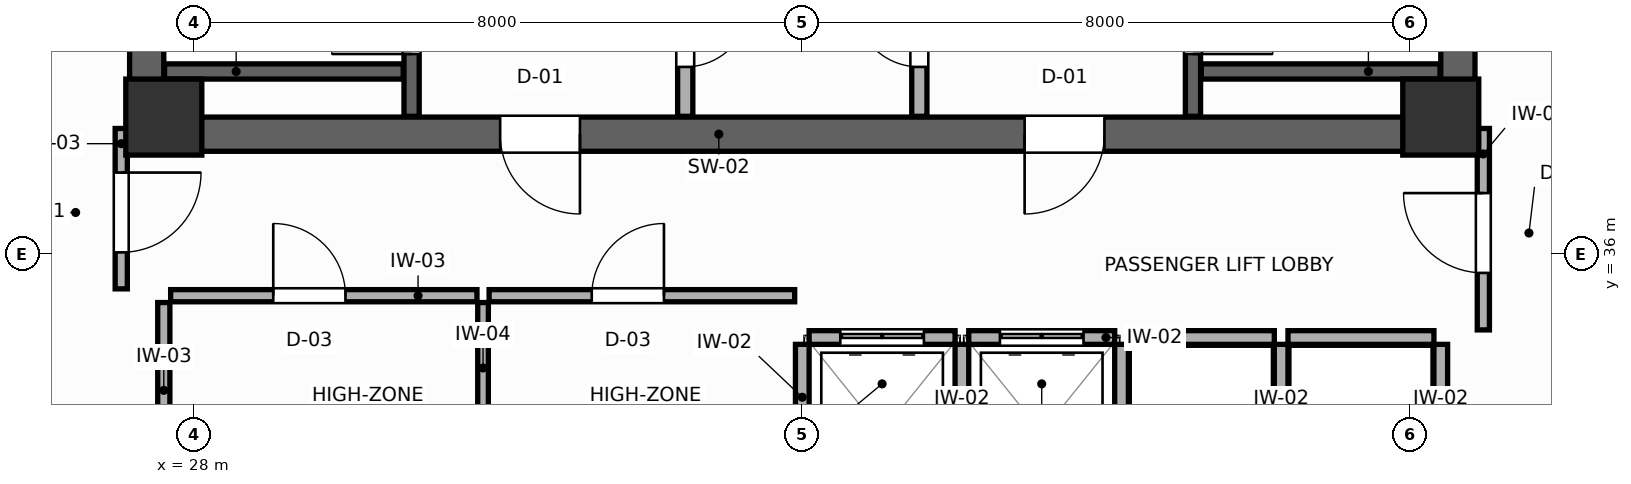
"""IFC4 building model, lengths in metres.
Left out: names, types, materials, properties, quantities, classifications, styles, units other than length and angle.
Written with IfcOpenShell. Run it as: python <this file> out.ifc"""

import sys

from ifc_helpers import new_model, si_unit, direction, frame, frame_2d, origin, origin_2d, place, context, subcontext, project, spatial, rectangle, extrude, source, transform, mapped, element, fill, save


model = new_model("IFC4")
c1 = context("Model", 3, precision=1e-05, world=origin(), true_north=direction((0.0, 1.0)))
c2 = subcontext(c1, "Body", "Model", "MODEL_VIEW")
j1 = project(units=[si_unit("LENGTHUNIT", "METRE"), si_unit("PLANEANGLEUNIT", "RADIAN")], contexts=[c1])
p1 = place(None, origin())
s1 = spatial("IfcSite", under=j1, at=p1, CompositionType="ELEMENT")
p2 = place(p1, origin())
s2 = spatial("IfcBuilding", under=s1, at=p2, CompositionType="ELEMENT")
p3 = place(p2, frame((0.0, 0.0, 190.2)))
s3 = spatial("IfcBuildingStorey", under=s2, at=p3, CompositionType="ELEMENT", Elevation=190.2)
p4 = place(p3, frame((27.15, 37.575, 0.0), z_axis=(0.0, 0.0, 1.0), x_axis=(1.0, 0.0, 0.0)))
e1 = element("IfcWall", 1, at=p4, inside=s3, PredefinedType="SHEAR", context=c2, shape_type="SweptSolid", body=[
    extrude(rectangle(XDim=17.7, YDim=0.45, at=frame_2d((8.85, 0.0))), origin(), (0.0, 0.0, 1.0), 3.6),
])
p5 = place(p4, frame((4.875, 0.0, 0.0)))
e2 = element("IfcOpeningElement", 2, at=p5, cuts=e1, PredefinedType="OPENING", context=c2, shape_type="SweptSolid", body=[
    extrude(rectangle(XDim=1.05, YDim=2.1, at=frame_2d((0.525, 1.05))), frame((0.0, 0.235, 0.0), z_axis=(0.0, -1.0, 0.0), x_axis=(1.0, 0.0, 0.0)), (0.0, 0.0, 1.0), 0.47),
])
p6 = place(p4, frame((11.775, 0.0, 0.0)))
e3 = element("IfcOpeningElement", 3, at=p6, cuts=e1, PredefinedType="OPENING", context=c2, shape_type="SweptSolid", body=[
    extrude(rectangle(XDim=1.05, YDim=2.1, at=frame_2d((0.525, 1.05))), frame((0.0, 0.235, 0.0), z_axis=(0.0, -1.0, 0.0), x_axis=(1.0, 0.0, 0.0)), (0.0, 0.0, 1.0), 0.47),
])
for number, where, z_axis, x_axis in (
    (4, (27.375, 37.8, 0.0), (0.0, 0.0, 1.0), (0.0, 1.0, 0.0)),
    (5, (44.625, 37.8, 0.0), (0.0, 0.0, 1.0), (0.0, 1.0, 0.0)),
):
    element("IfcWall", number, at=place(p3, frame(where, z_axis=z_axis, x_axis=x_axis)), inside=s3, PredefinedType="SHEAR", context=c2, shape_type="SweptSolid", body=[
        extrude(rectangle(XDim=9.0, YDim=0.45, at=frame_2d((4.5, 0.0))), origin(), (0.0, 0.0, 1.0), 3.6),
    ])
m1 = source(origin(), c2, "Body", "SweptSolid", [
    extrude(rectangle(XDim=1.0, YDim=1.0, at=origin_2d()), origin(), (0.0, 0.0, 1.0), 3.6),
])
for number, where, z_axis, x_axis in (
    (6, (27.6, 37.8, 0.0), (0.0, 0.0, 1.0), (1.0, 0.0, 0.0)),
    (7, (44.4, 37.8, 0.0), (0.0, 0.0, 1.0), (1.0, 0.0, 0.0)),
):
    element("IfcColumn", number, at=place(p3, frame(where, z_axis=z_axis, x_axis=x_axis)), inside=s3, PredefinedType="COLUMN", context=c2, shape_type="MappedRepresentation", body=[
        mapped(m1, transform((0.0, 0.0, 0.0), scale=1.0)),
    ])
p7 = place(p3, frame((30.86, 37.81, 0.0), z_axis=(0.0, 0.0, 1.0), x_axis=(0.0, 1.0, 0.0)))
e8 = element("IfcWall", 8, at=p7, inside=s3, PredefinedType="SHEAR", context=c2, shape_type="SweptSolid", body=[
    extrude(rectangle(XDim=8.98, YDim=0.2, at=frame_2d((4.49, 0.0))), origin(), (0.0, 0.0, 1.0), 3.6),
])
p8 = place(p7, frame((0.82, 0.0, 0.0)))
e9 = element("IfcOpeningElement", 9, at=p8, cuts=e8, PredefinedType="OPENING", context=c2, shape_type="SweptSolid", body=[
    extrude(rectangle(XDim=1.05, YDim=2.1, at=frame_2d((0.525, 1.05))), frame((0.0, 0.11, 0.0), z_axis=(0.0, -1.0, 0.0), x_axis=(1.0, 0.0, 0.0)), (0.0, 0.0, 1.0), 0.22),
])
p9 = place(p3, frame((27.61, 38.4, 0.0), z_axis=(0.0, 0.0, 1.0), x_axis=(1.0, 0.0, 0.0)))
e10 = element("IfcWall", 10, at=p9, inside=s3, PredefinedType="SHEAR", context=c2, shape_type="SweptSolid", body=[
    extrude(rectangle(XDim=3.14, YDim=0.2, at=frame_2d((1.57, 0.0))), origin(), (0.0, 0.0, 1.0), 3.6),
])
p10 = place(p3, frame((41.14, 37.81, 0.0), z_axis=(0.0, 0.0, 1.0), x_axis=(0.0, 1.0, 0.0)))
e11 = element("IfcWall", 11, at=p10, inside=s3, PredefinedType="SHEAR", context=c2, shape_type="SweptSolid", body=[
    extrude(rectangle(XDim=8.98, YDim=0.2, at=frame_2d((4.49, 0.0))), origin(), (0.0, 0.0, 1.0), 3.6),
])
p11 = place(p10, frame((0.82, 0.0, 0.0)))
e12 = element("IfcOpeningElement", 12, at=p11, cuts=e11, PredefinedType="OPENING", context=c2, shape_type="SweptSolid", body=[
    extrude(rectangle(XDim=1.05, YDim=2.1, at=frame_2d((0.525, 1.05))), frame((0.0, 0.11, 0.0), z_axis=(0.0, -1.0, 0.0), x_axis=(1.0, 0.0, 0.0)), (0.0, 0.0, 1.0), 0.22),
])
p12 = place(p3, frame((41.25, 38.4, 0.0), z_axis=(0.0, 0.0, 1.0), x_axis=(1.0, 0.0, 0.0)))
e13 = element("IfcWall", 13, at=p12, inside=s3, PredefinedType="SHEAR", context=c2, shape_type="SweptSolid", body=[
    extrude(rectangle(XDim=3.14, YDim=0.2, at=frame_2d((1.57, 0.0))), origin(), (0.0, 0.0, 1.0), 3.6),
])
p13 = place(p3, frame((34.46, 37.81, 0.0), z_axis=(0.0, 0.0, 1.0), x_axis=(0.0, 1.0, 0.0)))
e14 = element("IfcWall", 14, at=p13, inside=s3, PredefinedType="PARTITIONING", context=c2, shape_type="SweptSolid", body=[
    extrude(rectangle(XDim=8.98, YDim=0.2, at=frame_2d((4.49, 0.0))), origin(), (0.0, 0.0, 1.0), 3.4),
])
p14 = place(p13, frame((0.65, 0.0, 0.0)))
e15 = element("IfcOpeningElement", 15, at=p14, cuts=e14, PredefinedType="OPENING", context=c2, shape_type="SweptSolid", body=[
    extrude(rectangle(XDim=0.85, YDim=2.05, at=frame_2d((0.425, 1.025))), frame((0.0, 0.11, 0.0), z_axis=(0.0, -1.0, 0.0), x_axis=(1.0, 0.0, 0.0)), (0.0, 0.0, 1.0), 0.22),
])
p15 = place(p3, frame((37.54, 37.81, 0.0), z_axis=(0.0, 0.0, 1.0), x_axis=(0.0, 1.0, 0.0)))
e16 = element("IfcWall", 16, at=p15, inside=s3, PredefinedType="PARTITIONING", context=c2, shape_type="SweptSolid", body=[
    extrude(rectangle(XDim=8.98, YDim=0.2, at=frame_2d((4.49, 0.0))), origin(), (0.0, 0.0, 1.0), 3.4),
])
p16 = place(p15, frame((0.65, 0.0, 0.0)))
e17 = element("IfcOpeningElement", 17, at=p16, cuts=e16, PredefinedType="OPENING", context=c2, shape_type="SweptSolid", body=[
    extrude(rectangle(XDim=0.85, YDim=2.05, at=frame_2d((0.425, 1.025))), frame((0.0, 0.11, 0.0), z_axis=(0.0, -1.0, 0.0), x_axis=(1.0, 0.0, 0.0)), (0.0, 0.0, 1.0), 0.22),
])
p17 = place(p3, frame((36.09, 34.9, 0.0), z_axis=(0.0, 0.0, 1.0), x_axis=(1.0, 0.0, 0.0)))
e18 = element("IfcWall", 18, at=p17, inside=s3, PredefinedType="PARTITIONING", context=c2, shape_type="SweptSolid", body=[
    extrude(rectangle(XDim=1.92, YDim=0.18, at=frame_2d((0.96, 0.0))), origin(), (0.0, 0.0, 1.0), 3.4),
])
p18 = place(p17, frame((0.41, 0.0, 0.0)))
e19 = element("IfcOpeningElement", 19, at=p18, cuts=e18, PredefinedType="OPENING", context=c2, shape_type="SweptSolid", body=[
    extrude(rectangle(XDim=1.1, YDim=2.1, at=frame_2d((0.55, 1.05))), frame((0.0, 0.1, 0.0), z_axis=(0.0, -1.0, 0.0), x_axis=(1.0, 0.0, 0.0)), (0.0, 0.0, 1.0), 0.2),
])
p19 = place(p3, frame((36.0, 32.49, 0.0), z_axis=(0.0, 0.0, 1.0), x_axis=(0.0, 1.0, 0.0)))
e20 = element("IfcWall", 20, at=p19, inside=s3, PredefinedType="PARTITIONING", context=c2, shape_type="SweptSolid", body=[
    extrude(rectangle(XDim=2.32, YDim=0.18, at=frame_2d((1.16, 0.0))), origin(), (0.0, 0.0, 1.0), 3.4),
])
p20 = place(p3, frame((38.19, 34.9, 0.0), z_axis=(0.0, 0.0, 1.0), x_axis=(1.0, 0.0, 0.0)))
e21 = element("IfcWall", 21, at=p20, inside=s3, PredefinedType="PARTITIONING", context=c2, shape_type="SweptSolid", body=[
    extrude(rectangle(XDim=1.92, YDim=0.18, at=frame_2d((0.96, 0.0))), origin(), (0.0, 0.0, 1.0), 3.4),
])
p21 = place(p20, frame((0.41, 0.0, 0.0)))
e22 = element("IfcOpeningElement", 22, at=p21, cuts=e21, PredefinedType="OPENING", context=c2, shape_type="SweptSolid", body=[
    extrude(rectangle(XDim=1.1, YDim=2.1, at=frame_2d((0.55, 1.05))), frame((0.0, 0.1, 0.0), z_axis=(0.0, -1.0, 0.0), x_axis=(1.0, 0.0, 0.0)), (0.0, 0.0, 1.0), 0.2),
])
p22 = place(p3, frame((38.1, 32.49, 0.0), z_axis=(0.0, 0.0, 1.0), x_axis=(0.0, 1.0, 0.0)))
e23 = element("IfcWall", 23, at=p22, inside=s3, PredefinedType="PARTITIONING", context=c2, shape_type="SweptSolid", body=[
    extrude(rectangle(XDim=2.32, YDim=0.18, at=frame_2d((1.16, 0.0))), origin(), (0.0, 0.0, 1.0), 3.4),
])
p23 = place(p3, frame((40.29, 34.9, 0.0), z_axis=(0.0, 0.0, 1.0), x_axis=(1.0, 0.0, 0.0)))
e24 = element("IfcWall", 24, at=p23, inside=s3, PredefinedType="PARTITIONING", context=c2, shape_type="SweptSolid", body=[
    extrude(rectangle(XDim=1.92, YDim=0.18, at=frame_2d((0.96, 0.0))), origin(), (0.0, 0.0, 1.0), 3.4),
])
p24 = place(p3, frame((40.2, 32.49, 0.0), z_axis=(0.0, 0.0, 1.0), x_axis=(0.0, 1.0, 0.0)))
e25 = element("IfcWall", 25, at=p24, inside=s3, PredefinedType="PARTITIONING", context=c2, shape_type="SweptSolid", body=[
    extrude(rectangle(XDim=2.32, YDim=0.18, at=frame_2d((1.16, 0.0))), origin(), (0.0, 0.0, 1.0), 3.4),
])
p25 = place(p3, frame((42.39, 34.9, 0.0), z_axis=(0.0, 0.0, 1.0), x_axis=(1.0, 0.0, 0.0)))
e26 = element("IfcWall", 26, at=p25, inside=s3, PredefinedType="PARTITIONING", context=c2, shape_type="SweptSolid", body=[
    extrude(rectangle(XDim=1.92, YDim=0.18, at=frame_2d((0.96, 0.0))), origin(), (0.0, 0.0, 1.0), 3.4),
])
for number, where, z_axis, x_axis in (
    (27, (42.3, 32.49, 0.0), (0.0, 0.0, 1.0), (0.0, 1.0, 0.0)),
    (28, (44.4, 32.49, 0.0), (0.0, 0.0, 1.0), (0.0, 1.0, 0.0)),
):
    element("IfcWall", number, at=place(p3, frame(where, z_axis=z_axis, x_axis=x_axis)), inside=s3, PredefinedType="PARTITIONING", context=c2, shape_type="SweptSolid", body=[
        extrude(rectangle(XDim=2.32, YDim=0.18, at=frame_2d((1.16, 0.0))), origin(), (0.0, 0.0, 1.0), 3.4),
    ])
p26 = place(p3, frame((27.6, 33.05, 0.0), z_axis=(0.0, 0.0, 1.0), x_axis=(0.0, 1.0, 0.0)))
e29 = element("IfcWall", 29, at=p26, inside=s3, PredefinedType="PARTITIONING", context=c2, shape_type="SweptSolid", body=[
    extrude(rectangle(XDim=2.31, YDim=0.16, at=frame_2d((1.155, 0.0))), origin(), (0.0, 0.0, 1.0), 3.4),
])
p27 = place(p3, frame((31.8, 32.49, 0.0), z_axis=(0.0, 0.0, 1.0), x_axis=(0.0, 1.0, 0.0)))
e30 = element("IfcWall", 30, at=p27, inside=s3, PredefinedType="PARTITIONING", context=c2, shape_type="SweptSolid", body=[
    extrude(rectangle(XDim=2.87, YDim=0.14, at=frame_2d((1.435, 0.0))), origin(), (0.0, 0.0, 1.0), 3.4),
])
p28 = place(p3, frame((27.69, 35.45, 0.0), z_axis=(0.0, 0.0, 1.0), x_axis=(1.0, 0.0, 0.0)))
e31 = element("IfcWall", 31, at=p28, inside=s3, PredefinedType="PARTITIONING", context=c2, shape_type="SweptSolid", body=[
    extrude(rectangle(XDim=4.03, YDim=0.16, at=frame_2d((2.015, 0.0))), origin(), (0.0, 0.0, 1.0), 3.4),
])
p29 = place(p28, frame((1.35, 0.0, 0.0)))
e32 = element("IfcOpeningElement", 32, at=p29, cuts=e31, PredefinedType="OPENING", context=c2, shape_type="SweptSolid", body=[
    extrude(rectangle(XDim=0.95, YDim=2.05, at=frame_2d((0.475, 1.025))), frame((0.0, 0.09, 0.0), z_axis=(0.0, -1.0, 0.0), x_axis=(1.0, 0.0, 0.0)), (0.0, 0.0, 1.0), 0.18),
])
p30 = place(p3, frame((31.88, 35.45, 0.0), z_axis=(0.0, 0.0, 1.0), x_axis=(1.0, 0.0, 0.0)))
e33 = element("IfcWall", 33, at=p30, inside=s3, PredefinedType="PARTITIONING", context=c2, shape_type="SweptSolid", body=[
    extrude(rectangle(XDim=4.02, YDim=0.16, at=frame_2d((2.01, 0.0))), origin(), (0.0, 0.0, 1.0), 3.4),
])
p31 = place(p30, frame((1.35, 0.0, 0.0)))
e34 = element("IfcOpeningElement", 34, at=p31, cuts=e33, PredefinedType="OPENING", context=c2, shape_type="SweptSolid", body=[
    extrude(rectangle(XDim=0.95, YDim=2.05, at=frame_2d((0.475, 1.025))), frame((0.0, 0.09, 0.0), z_axis=(0.0, -1.0, 0.0), x_axis=(1.0, 0.0, 0.0)), (0.0, 0.0, 1.0), 0.18),
])
p32 = place(p3, frame((27.04, 35.54, 0.0), z_axis=(0.0, 0.0, 1.0), x_axis=(0.0, 1.0, 0.0)))
e35 = element("IfcWall", 35, at=p32, inside=s3, PredefinedType="PARTITIONING", context=c2, shape_type="SweptSolid", body=[
    extrude(rectangle(XDim=2.11, YDim=0.16, at=frame_2d((1.055, 0.0))), origin(), (0.0, 0.0, 1.0), 3.4),
])
p33 = place(p32, frame((0.48, 0.0, 0.0)))
e36 = element("IfcOpeningElement", 36, at=p33, cuts=e35, PredefinedType="OPENING", context=c2, shape_type="SweptSolid", body=[
    extrude(rectangle(XDim=1.05, YDim=2.1, at=frame_2d((0.525, 1.05))), frame((0.0, 0.09, 0.0), z_axis=(0.0, -1.0, 0.0), x_axis=(1.0, 0.0, 0.0)), (0.0, 0.0, 1.0), 0.18),
])
p34 = place(p3, frame((44.96, 35.0, 0.0), z_axis=(0.0, 0.0, 1.0), x_axis=(0.0, 1.0, 0.0)))
e37 = element("IfcWall", 37, at=p34, inside=s3, PredefinedType="PARTITIONING", context=c2, shape_type="SweptSolid", body=[
    extrude(rectangle(XDim=2.65, YDim=0.16, at=frame_2d((1.325, 0.0))), origin(), (0.0, 0.0, 1.0), 3.4),
])
p35 = place(p34, frame((0.75, 0.0, 0.0)))
e38 = element("IfcOpeningElement", 38, at=p35, cuts=e37, PredefinedType="OPENING", context=c2, shape_type="SweptSolid", body=[
    extrude(rectangle(XDim=1.05, YDim=2.1, at=frame_2d((0.525, 1.05))), frame((0.0, 0.09, 0.0), z_axis=(0.0, -1.0, 0.0), x_axis=(1.0, 0.0, 0.0)), (0.0, 0.0, 1.0), 0.18),
])
p36 = place(p8, origin())
e39 = element("IfcDoor", 39, at=p36, inside=s3, OperationType="SINGLE_SWING_LEFT", PredefinedType="DOOR", context=c2, shape_type="SweptSolid", body=[
    extrude(rectangle(XDim=1.05, YDim=2.1, at=frame_2d((0.525, 1.05))), frame((0.0, 0.025, 0.0), z_axis=(0.0, -1.0, 0.0), x_axis=(1.0, 0.0, 0.0)), (0.0, 0.0, 1.0), 0.05),
])
fill(e9, e39)
p37 = place(p11, frame((1.05, 0.0, 0.0), z_axis=(0.0, 0.0, 1.0), x_axis=(-1.0, 0.0, 0.0)))
e40 = element("IfcDoor", 40, at=p37, inside=s3, OperationType="SINGLE_SWING_RIGHT", PredefinedType="DOOR", context=c2, shape_type="SweptSolid", body=[
    extrude(rectangle(XDim=1.05, YDim=2.1, at=frame_2d((0.525, 1.05))), frame((0.0, 0.025, 0.0), z_axis=(0.0, -1.0, 0.0), x_axis=(1.0, 0.0, 0.0)), (0.0, 0.0, 1.0), 0.05),
])
fill(e12, e40)
p38 = place(p14, frame((0.85, 0.0, 0.0), z_axis=(0.0, 0.0, 1.0), x_axis=(-1.0, 0.0, 0.0)))
e41 = element("IfcDoor", 41, at=p38, inside=s3, OperationType="SINGLE_SWING_LEFT", PredefinedType="DOOR", context=c2, shape_type="SweptSolid", body=[
    extrude(rectangle(XDim=0.85, YDim=2.05, at=frame_2d((0.425, 1.025))), frame((0.0, 0.025, 0.0), z_axis=(0.0, -1.0, 0.0), x_axis=(1.0, 0.0, 0.0)), (0.0, 0.0, 1.0), 0.05),
])
fill(e15, e41)
p39 = place(p16, origin())
e42 = element("IfcDoor", 42, at=p39, inside=s3, OperationType="SINGLE_SWING_RIGHT", PredefinedType="DOOR", context=c2, shape_type="SweptSolid", body=[
    extrude(rectangle(XDim=0.85, YDim=2.05, at=frame_2d((0.425, 1.025))), frame((0.0, 0.025, 0.0), z_axis=(0.0, -1.0, 0.0), x_axis=(1.0, 0.0, 0.0)), (0.0, 0.0, 1.0), 0.05),
])
fill(e17, e42)
p40 = place(p18, origin())
e43 = element("IfcDoor", 43, at=p40, inside=s3, OperationType="DOUBLE_DOOR_SLIDING", PredefinedType="DOOR", context=c2, shape_type="SweptSolid", body=[
    extrude(rectangle(XDim=1.1, YDim=2.1, at=frame_2d((0.55, 1.05))), frame((0.0, 0.025, 0.0), z_axis=(0.0, -1.0, 0.0), x_axis=(1.0, 0.0, 0.0)), (0.0, 0.0, 1.0), 0.05),
])
fill(e19, e43)
p41 = place(p21, origin())
e44 = element("IfcDoor", 44, at=p41, inside=s3, OperationType="DOUBLE_DOOR_SLIDING", PredefinedType="DOOR", context=c2, shape_type="SweptSolid", body=[
    extrude(rectangle(XDim=1.1, YDim=2.1, at=frame_2d((0.55, 1.05))), frame((0.0, 0.025, 0.0), z_axis=(0.0, -1.0, 0.0), x_axis=(1.0, 0.0, 0.0)), (0.0, 0.0, 1.0), 0.05),
])
fill(e22, e44)
p42 = place(p29, origin())
e45 = element("IfcDoor", 45, at=p42, inside=s3, OperationType="SINGLE_SWING_LEFT", PredefinedType="DOOR", context=c2, shape_type="SweptSolid", body=[
    extrude(rectangle(XDim=0.95, YDim=2.05, at=frame_2d((0.475, 1.025))), frame((0.0, 0.025, 0.0), z_axis=(0.0, -1.0, 0.0), x_axis=(1.0, 0.0, 0.0)), (0.0, 0.0, 1.0), 0.05),
])
fill(e32, e45)
p43 = place(p31, origin())
e46 = element("IfcDoor", 46, at=p43, inside=s3, OperationType="SINGLE_SWING_RIGHT", PredefinedType="DOOR", context=c2, shape_type="SweptSolid", body=[
    extrude(rectangle(XDim=0.95, YDim=2.05, at=frame_2d((0.475, 1.025))), frame((0.0, 0.025, 0.0), z_axis=(0.0, -1.0, 0.0), x_axis=(1.0, 0.0, 0.0)), (0.0, 0.0, 1.0), 0.05),
])
fill(e34, e46)
p44 = place(p33, frame((1.05, 0.0, 0.0), z_axis=(0.0, 0.0, 1.0), x_axis=(-1.0, 0.0, 0.0)))
e47 = element("IfcDoor", 47, at=p44, inside=s3, OperationType="SINGLE_SWING_LEFT", PredefinedType="DOOR", context=c2, shape_type="SweptSolid", body=[
    extrude(rectangle(XDim=1.05, YDim=2.1, at=frame_2d((0.525, 1.05))), frame((0.0, 0.025, 0.0), z_axis=(0.0, -1.0, 0.0), x_axis=(1.0, 0.0, 0.0)), (0.0, 0.0, 1.0), 0.05),
])
fill(e36, e47)
p45 = place(p35, origin())
e48 = element("IfcDoor", 48, at=p45, inside=s3, OperationType="SINGLE_SWING_RIGHT", PredefinedType="DOOR", context=c2, shape_type="SweptSolid", body=[
    extrude(rectangle(XDim=1.05, YDim=2.1, at=frame_2d((0.525, 1.05))), frame((0.0, 0.025, 0.0), z_axis=(0.0, -1.0, 0.0), x_axis=(1.0, 0.0, 0.0)), (0.0, 0.0, 1.0), 0.05),
])
fill(e38, e48)
p46 = place(p5, frame((1.05, 0.0, 0.0), z_axis=(0.0, 0.0, 1.0), x_axis=(-1.0, 0.0, 0.0)))
e49 = element("IfcDoor", 49, at=p46, inside=s3, OperationType="SINGLE_SWING_LEFT", PredefinedType="DOOR", context=c2, shape_type="SweptSolid", body=[
    extrude(rectangle(XDim=1.05, YDim=2.1, at=frame_2d((0.525, 1.05))), frame((0.0, 0.025, 0.0), z_axis=(0.0, -1.0, 0.0), x_axis=(1.0, 0.0, 0.0)), (0.0, 0.0, 1.0), 0.05),
])
fill(e2, e49)
p47 = place(p6, frame((1.05, 0.0, 0.0), z_axis=(0.0, 0.0, 1.0), x_axis=(-1.0, 0.0, 0.0)))
e50 = element("IfcDoor", 50, at=p47, inside=s3, OperationType="SINGLE_SWING_RIGHT", PredefinedType="DOOR", context=c2, shape_type="SweptSolid", body=[
    extrude(rectangle(XDim=1.05, YDim=2.1, at=frame_2d((0.525, 1.05))), frame((0.0, 0.025, 0.0), z_axis=(0.0, -1.0, 0.0), x_axis=(1.0, 0.0, 0.0)), (0.0, 0.0, 1.0), 0.05),
])
fill(e3, e50)
save(model, sys.argv[1])
